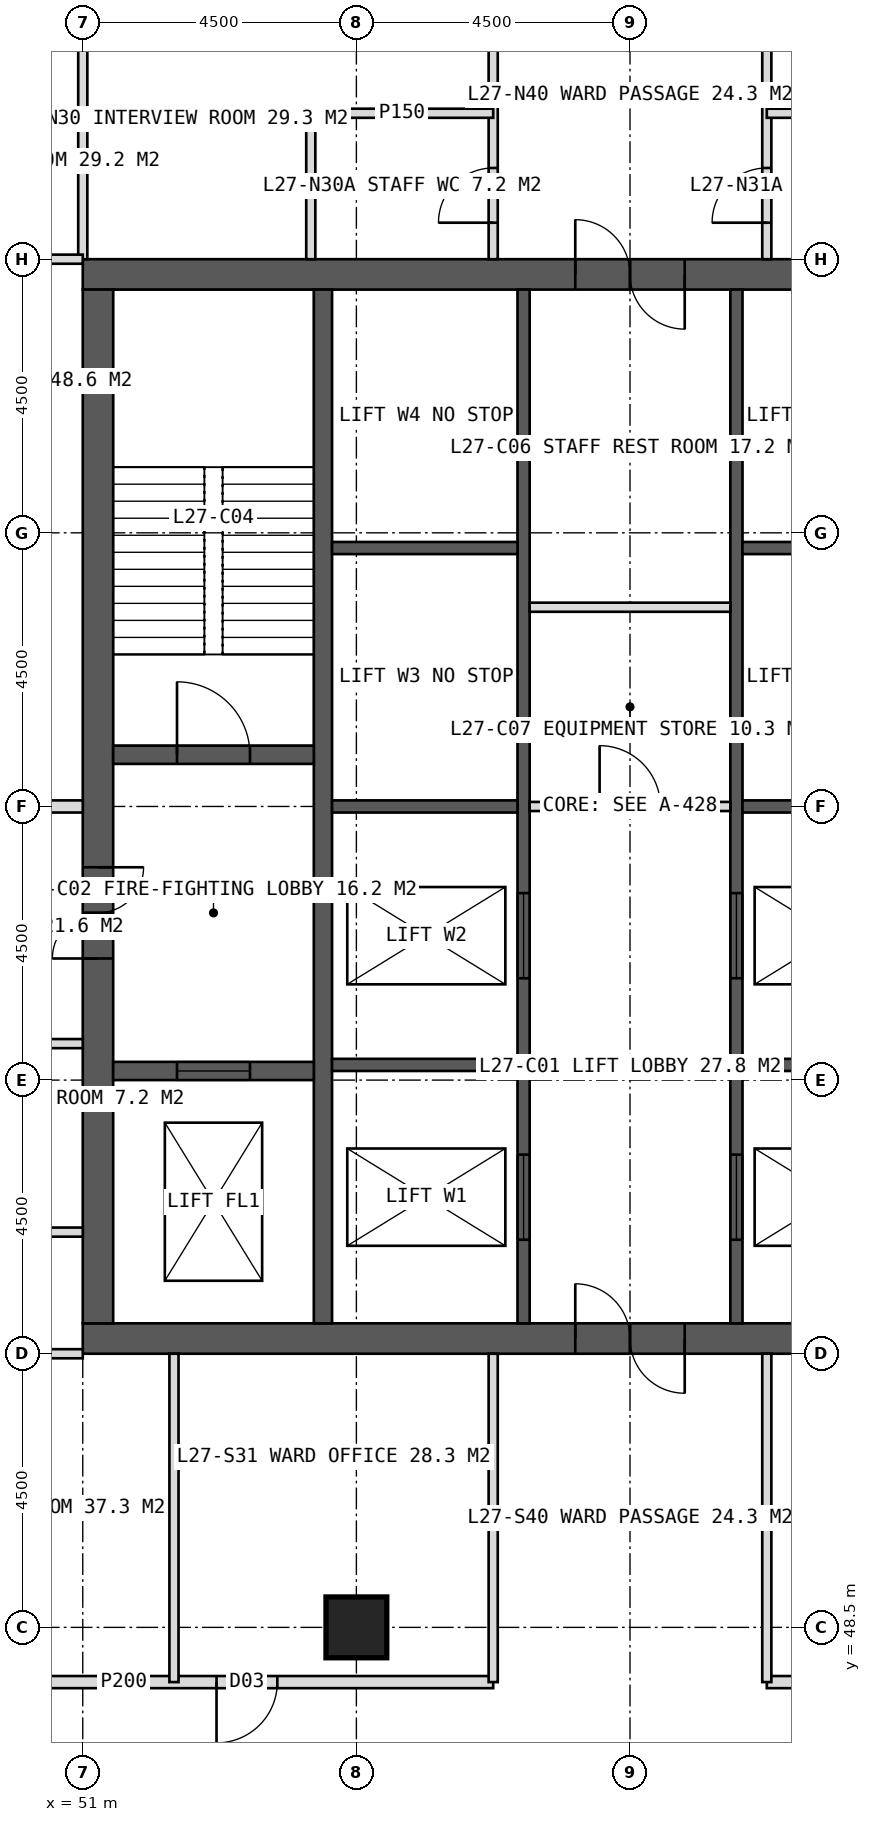
"""IFC4 building model, lengths in metres.
Left out: names, types, materials, properties, quantities, classifications, styles, units other than length and angle.
Written with IfcOpenShell. Run it as: python <this file> out.ifc"""

import sys

from ifc_helpers import new_model, si_unit, direction, frame, frame_2d, origin, origin_2d, place, context, subcontext, project, spatial, rectangle, hollow_rectangle, extrude, element, fill, save


model = new_model("IFC4")
c1 = context("Model", 3, precision=1e-05, world=origin(), true_north=direction((0.0, 1.0)))
c2 = subcontext(c1, "Body", "Model", "MODEL_VIEW")
j1 = project(units=[si_unit("LENGTHUNIT", "METRE"), si_unit("PLANEANGLEUNIT", "RADIAN")], contexts=[c1])
p1 = place(None, origin())
s1 = spatial("IfcSite", under=j1, at=p1, CompositionType="ELEMENT")
p2 = place(p1, origin())
s2 = spatial("IfcBuilding", under=s1, at=p2, CompositionType="ELEMENT")
p3 = place(p2, frame((0.0, 0.0, 116.0)))
s3 = spatial("IfcBuildingStorey", under=s2, at=p3, CompositionType="ELEMENT", Elevation=116.0)
p4 = place(p3, frame((51.0, 70.75, 0.0), z_axis=(0.0, 0.0, 1.0), x_axis=(1.0, 0.0, 0.0)))
e1 = element("IfcWall", 1, at=p4, inside=s3, PredefinedType="SHEAR", context=c2, shape_type="SweptSolid", body=[
    extrude(rectangle(XDim=18.0, YDim=0.5, at=frame_2d((9.0, 0.0))), origin(), (0.0, 0.0, 1.0), 4.0),
])
p5 = place(p4, frame((8.1, 0.0, 0.0)))
e2 = element("IfcOpeningElement", 2, at=p5, cuts=e1, PredefinedType="OPENING", context=c2, shape_type="SweptSolid", body=[
    extrude(rectangle(XDim=1.8, YDim=2.2, at=frame_2d((0.9, 1.1))), frame((0.0, 0.26, 0.0), z_axis=(0.0, -1.0, 0.0), x_axis=(1.0, 0.0, 0.0)), (0.0, 0.0, 1.0), 0.52),
])
p6 = place(p3, frame((51.0, 53.25, 0.0), z_axis=(0.0, 0.0, 1.0), x_axis=(1.0, 0.0, 0.0)))
e3 = element("IfcWall", 3, at=p6, inside=s3, PredefinedType="SHEAR", context=c2, shape_type="SweptSolid", body=[
    extrude(rectangle(XDim=18.0, YDim=0.5, at=frame_2d((9.0, 0.0))), origin(), (0.0, 0.0, 1.0), 4.0),
])
p7 = place(p6, frame((8.1, 0.0, 0.0)))
e4 = element("IfcOpeningElement", 4, at=p7, cuts=e3, PredefinedType="OPENING", context=c2, shape_type="SweptSolid", body=[
    extrude(rectangle(XDim=1.8, YDim=2.2, at=frame_2d((0.9, 1.1))), frame((0.0, 0.26, 0.0), z_axis=(0.0, -1.0, 0.0), x_axis=(1.0, 0.0, 0.0)), (0.0, 0.0, 1.0), 0.52),
])
p8 = place(p3, frame((51.25, 53.5, 0.0), z_axis=(0.0, 0.0, 1.0), x_axis=(0.0, 1.0, 0.0)))
e5 = element("IfcWall", 5, at=p8, inside=s3, PredefinedType="SHEAR", context=c2, shape_type="SweptSolid", body=[
    extrude(rectangle(XDim=17.0, YDim=0.5, at=frame_2d((8.5, 0.0))), origin(), (0.0, 0.0, 1.0), 4.0),
])
p9 = place(p8, frame((6.0, 0.0, 0.0)))
e6 = element("IfcOpeningElement", 6, at=p9, cuts=e5, PredefinedType="OPENING", context=c2, shape_type="SweptSolid", body=[
    extrude(rectangle(XDim=1.5, YDim=2.2, at=frame_2d((0.75, 1.1))), frame((0.0, 0.26, 0.0), z_axis=(0.0, -1.0, 0.0), x_axis=(1.0, 0.0, 0.0)), (0.0, 0.0, 1.0), 0.52),
])
p10 = place(p3, frame((54.95, 53.5, 0.0), z_axis=(0.0, 0.0, 1.0), x_axis=(0.0, 1.0, 0.0)))
e7 = element("IfcWall", 7, at=p10, inside=s3, PredefinedType="SHEAR", context=c2, shape_type="SweptSolid", body=[
    extrude(rectangle(XDim=17.0, YDim=0.3, at=frame_2d((8.5, 0.0))), origin(), (0.0, 0.0, 1.0), 4.0),
])
p11 = place(p3, frame((58.25, 53.5, 0.0), z_axis=(0.0, 0.0, 1.0), x_axis=(0.0, 1.0, 0.0)))
e8 = element("IfcWall", 8, at=p11, inside=s3, PredefinedType="SHEAR", context=c2, shape_type="SweptSolid", body=[
    extrude(rectangle(XDim=17.0, YDim=0.2, at=frame_2d((8.5, 0.0))), origin(), (0.0, 0.0, 1.0), 4.0),
])
p12 = place(p11, frame((1.375, 0.0, 0.0)))
e9 = element("IfcOpeningElement", 9, at=p12, cuts=e8, PredefinedType="OPENING", context=c2, shape_type="SweptSolid", body=[
    extrude(rectangle(XDim=1.4, YDim=2.2, at=frame_2d((0.7, 1.1))), frame((0.0, 0.11, 0.0), z_axis=(0.0, -1.0, 0.0), x_axis=(1.0, 0.0, 0.0)), (0.0, 0.0, 1.0), 0.22),
])
p13 = place(p11, frame((5.675, 0.0, 0.0)))
e10 = element("IfcOpeningElement", 10, at=p13, cuts=e8, PredefinedType="OPENING", context=c2, shape_type="SweptSolid", body=[
    extrude(rectangle(XDim=1.4, YDim=2.2, at=frame_2d((0.7, 1.1))), frame((0.0, 0.11, 0.0), z_axis=(0.0, -1.0, 0.0), x_axis=(1.0, 0.0, 0.0)), (0.0, 0.0, 1.0), 0.22),
])
p14 = place(p3, frame((61.75, 53.5, 0.0), z_axis=(0.0, 0.0, 1.0), x_axis=(0.0, 1.0, 0.0)))
e11 = element("IfcWall", 11, at=p14, inside=s3, PredefinedType="SHEAR", context=c2, shape_type="SweptSolid", body=[
    extrude(rectangle(XDim=17.0, YDim=0.2, at=frame_2d((8.5, 0.0))), origin(), (0.0, 0.0, 1.0), 4.0),
])
p15 = place(p14, frame((1.375, 0.0, 0.0)))
e12 = element("IfcOpeningElement", 12, at=p15, cuts=e11, PredefinedType="OPENING", context=c2, shape_type="SweptSolid", body=[
    extrude(rectangle(XDim=1.4, YDim=2.2, at=frame_2d((0.7, 1.1))), frame((0.0, 0.11, 0.0), z_axis=(0.0, -1.0, 0.0), x_axis=(1.0, 0.0, 0.0)), (0.0, 0.0, 1.0), 0.22),
])
p16 = place(p14, frame((5.675, 0.0, 0.0)))
e13 = element("IfcOpeningElement", 13, at=p16, cuts=e11, PredefinedType="OPENING", context=c2, shape_type="SweptSolid", body=[
    extrude(rectangle(XDim=1.4, YDim=2.2, at=frame_2d((0.7, 1.1))), frame((0.0, 0.11, 0.0), z_axis=(0.0, -1.0, 0.0), x_axis=(1.0, 0.0, 0.0)), (0.0, 0.0, 1.0), 0.22),
])
for number, where, z_axis, x_axis in (
    (14, (55.1, 57.75, 0.0), (0.0, 0.0, 1.0), (1.0, 0.0, 0.0)),
    (15, (61.85, 57.75, 0.0), (0.0, 0.0, 1.0), (1.0, 0.0, 0.0)),
    (16, (55.1, 62.0, 0.0), (0.0, 0.0, 1.0), (1.0, 0.0, 0.0)),
    (17, (61.85, 62.0, 0.0), (0.0, 0.0, 1.0), (1.0, 0.0, 0.0)),
    (18, (55.1, 66.25, 0.0), (0.0, 0.0, 1.0), (1.0, 0.0, 0.0)),
    (19, (61.85, 66.25, 0.0), (0.0, 0.0, 1.0), (1.0, 0.0, 0.0)),
):
    element("IfcWall", number, at=place(p3, frame(where, z_axis=z_axis, x_axis=x_axis)), inside=s3, PredefinedType="SHEAR", context=c2, shape_type="SweptSolid", body=[
        extrude(rectangle(XDim=3.05, YDim=0.2, at=frame_2d((1.525, 0.0))), origin(), (0.0, 0.0, 1.0), 4.0),
    ])
p17 = place(p3, frame((51.5, 62.85, 0.0), z_axis=(0.0, 0.0, 1.0), x_axis=(1.0, 0.0, 0.0)))
e20 = element("IfcWall", 20, at=p17, inside=s3, PredefinedType="SHEAR", context=c2, shape_type="SweptSolid", body=[
    extrude(rectangle(XDim=3.3, YDim=0.3, at=frame_2d((1.65, 0.0))), origin(), (0.0, 0.0, 1.0), 4.0),
])
p18 = place(p17, frame((1.05, 0.0, 0.0)))
e21 = element("IfcOpeningElement", 21, at=p18, cuts=e20, PredefinedType="OPENING", context=c2, shape_type="SweptSolid", body=[
    extrude(rectangle(XDim=1.2, YDim=2.1, at=frame_2d((0.6, 1.05))), frame((0.0, 0.16, 0.0), z_axis=(0.0, -1.0, 0.0), x_axis=(1.0, 0.0, 0.0)), (0.0, 0.0, 1.0), 0.32),
])
p19 = place(p3, frame((51.5, 57.65, 0.0), z_axis=(0.0, 0.0, 1.0), x_axis=(1.0, 0.0, 0.0)))
e22 = element("IfcWall", 22, at=p19, inside=s3, PredefinedType="SHEAR", context=c2, shape_type="SweptSolid", body=[
    extrude(rectangle(XDim=3.3, YDim=0.3, at=frame_2d((1.65, 0.0))), origin(), (0.0, 0.0, 1.0), 4.0),
])
p20 = place(p19, frame((1.05, 0.0, 0.0)))
e23 = element("IfcOpeningElement", 23, at=p20, cuts=e22, PredefinedType="OPENING", context=c2, shape_type="SweptSolid", body=[
    extrude(rectangle(XDim=1.2, YDim=2.2, at=frame_2d((0.6, 1.1))), frame((0.0, 0.16, 0.0), z_axis=(0.0, -1.0, 0.0), x_axis=(1.0, 0.0, 0.0)), (0.0, 0.0, 1.0), 0.32),
])
p21 = place(p3, frame((55.5, 48.5, 0.0), z_axis=(0.0, 0.0, 1.0), x_axis=(1.0, 0.0, 0.0)))
e24 = element("IfcColumn", 24, at=p21, inside=s3, PredefinedType="COLUMN", context=c2, shape_type="SweptSolid", body=[
    extrude(hollow_rectangle(XDim=1.0, YDim=1.0, WallThickness=0.1, at=origin_2d()), origin(), (0.0, 0.0, 1.0), 4.0),
])
p22 = place(p3, frame((51.0, 71.0, 0.0), z_axis=(0.0, 0.0, 1.0), x_axis=(0.0, 1.0, 0.0)))
e25 = element("IfcWall", 25, at=p22, inside=s3, PredefinedType="PARTITIONING", context=c2, shape_type="SweptSolid", body=[
    extrude(rectangle(XDim=5.4, YDim=0.15, at=frame_2d((2.7, 0.0))), origin(), (0.0, 0.0, 1.0), 3.75),
])
p23 = place(p3, frame((57.75, 71.0, 0.0), z_axis=(0.0, 0.0, 1.0), x_axis=(0.0, 1.0, 0.0)))
e26 = element("IfcWall", 26, at=p23, inside=s3, PredefinedType="PARTITIONING", context=c2, shape_type="SweptSolid", body=[
    extrude(rectangle(XDim=5.4, YDim=0.15, at=frame_2d((2.7, 0.0))), origin(), (0.0, 0.0, 1.0), 3.75),
])
p24 = place(p23, frame((0.6, 0.0, 0.0)))
e27 = element("IfcOpeningElement", 27, at=p24, cuts=e26, PredefinedType="OPENING", context=c2, shape_type="SweptSolid", body=[
    extrude(rectangle(XDim=0.9, YDim=2.1, at=frame_2d((0.45, 1.05))), frame((0.0, 0.085, 0.0), z_axis=(0.0, -1.0, 0.0), x_axis=(1.0, 0.0, 0.0)), (0.0, 0.0, 1.0), 0.17),
])
p25 = place(p3, frame((62.25, 71.0, 0.0), z_axis=(0.0, 0.0, 1.0), x_axis=(0.0, 1.0, 0.0)))
e28 = element("IfcWall", 28, at=p25, inside=s3, PredefinedType="PARTITIONING", context=c2, shape_type="SweptSolid", body=[
    extrude(rectangle(XDim=5.4, YDim=0.15, at=frame_2d((2.7, 0.0))), origin(), (0.0, 0.0, 1.0), 3.75),
])
p26 = place(p25, frame((0.6, 0.0, 0.0)))
e29 = element("IfcOpeningElement", 29, at=p26, cuts=e28, PredefinedType="OPENING", context=c2, shape_type="SweptSolid", body=[
    extrude(rectangle(XDim=0.9, YDim=2.1, at=frame_2d((0.45, 1.05))), frame((0.0, 0.085, 0.0), z_axis=(0.0, -1.0, 0.0), x_axis=(1.0, 0.0, 0.0)), (0.0, 0.0, 1.0), 0.17),
])
p27 = place(p3, frame((54.75, 73.4, 0.0), z_axis=(0.0, 0.0, 1.0), x_axis=(1.0, 0.0, 0.0)))
e30 = element("IfcWall", 30, at=p27, inside=s3, PredefinedType="PARTITIONING", context=c2, shape_type="SweptSolid", body=[
    extrude(rectangle(XDim=3.0, YDim=0.15, at=frame_2d((1.5, 0.0))), origin(), (0.0, 0.0, 1.0), 3.75),
])
p28 = place(p3, frame((54.75, 71.0, 0.0), z_axis=(0.0, 0.0, 1.0), x_axis=(0.0, 1.0, 0.0)))
e31 = element("IfcWall", 31, at=p28, inside=s3, PredefinedType="PARTITIONING", context=c2, shape_type="SweptSolid", body=[
    extrude(rectangle(XDim=2.4, YDim=0.15, at=frame_2d((1.2, 0.0))), origin(), (0.0, 0.0, 1.0), 3.75),
])
p29 = place(p3, frame((62.25, 73.4, 0.0), z_axis=(0.0, 0.0, 1.0), x_axis=(1.0, 0.0, 0.0)))
e32 = element("IfcWall", 32, at=p29, inside=s3, PredefinedType="PARTITIONING", context=c2, shape_type="SweptSolid", body=[
    extrude(rectangle(XDim=3.0, YDim=0.15, at=frame_2d((1.5, 0.0))), origin(), (0.0, 0.0, 1.0), 3.75),
])
p30 = place(p3, frame((51.0, 53.0, 0.0), z_axis=(0.0, 0.0, 1.0), x_axis=(-1.0, 0.0, 0.0)))
e33 = element("IfcWall", 33, at=p30, inside=s3, PredefinedType="PARTITIONING", context=c2, shape_type="SweptSolid", body=[
    extrude(rectangle(XDim=5.4, YDim=0.15, at=frame_2d((2.7, 0.0))), origin(), (0.0, 0.0, 1.0), 3.75),
])
p31 = place(p3, frame((51.0, 58.1, 0.0), z_axis=(0.0, 0.0, 1.0), x_axis=(-1.0, 0.0, 0.0)))
e34 = element("IfcWall", 34, at=p31, inside=s3, PredefinedType="PARTITIONING", context=c2, shape_type="SweptSolid", body=[
    extrude(rectangle(XDim=5.4, YDim=0.15, at=frame_2d((2.7, 0.0))), origin(), (0.0, 0.0, 1.0), 3.75),
])
p32 = place(p31, frame((0.6, 0.0, 0.0)))
e35 = element("IfcOpeningElement", 35, at=p32, cuts=e34, PredefinedType="OPENING", context=c2, shape_type="SweptSolid", body=[
    extrude(rectangle(XDim=0.9, YDim=2.1, at=frame_2d((0.45, 1.05))), frame((0.0, 0.085, 0.0), z_axis=(0.0, -1.0, 0.0), x_axis=(1.0, 0.0, 0.0)), (0.0, 0.0, 1.0), 0.17),
])
p33 = place(p3, frame((51.0, 62.0, 0.0), z_axis=(0.0, 0.0, 1.0), x_axis=(-1.0, 0.0, 0.0)))
e36 = element("IfcWall", 36, at=p33, inside=s3, PredefinedType="SOLIDWALL", context=c2, shape_type="SweptSolid", body=[
    extrude(rectangle(XDim=5.4, YDim=0.2, at=frame_2d((2.7, 0.0))), origin(), (0.0, 0.0, 1.0), 2.95),
])
p34 = place(p3, frame((51.0, 71.0, 0.0), z_axis=(0.0, 0.0, 1.0), x_axis=(-1.0, 0.0, 0.0)))
e37 = element("IfcWall", 37, at=p34, inside=s3, PredefinedType="PARTITIONING", context=c2, shape_type="SweptSolid", body=[
    extrude(rectangle(XDim=5.4, YDim=0.15, at=frame_2d((2.7, 0.0))), origin(), (0.0, 0.0, 1.0), 3.75),
])
p35 = place(p3, frame((51.0, 55.0, 0.0), z_axis=(0.0, 0.0, 1.0), x_axis=(-1.0, 0.0, 0.0)))
e38 = element("IfcWall", 38, at=p35, inside=s3, PredefinedType="PARTITIONING", context=c2, shape_type="SweptSolid", body=[
    extrude(rectangle(XDim=2.4, YDim=0.15, at=frame_2d((1.2, 0.0))), origin(), (0.0, 0.0, 1.0), 3.75),
])
p36 = place(p3, frame((74.4, 47.6, 0.0), z_axis=(0.0, 0.0, 1.0), x_axis=(-1.0, 0.0, 0.0)))
e39 = element("IfcWall", 39, at=p36, inside=s3, PredefinedType="PARTITIONING", context=c2, shape_type="SweptSolid", body=[
    extrude(rectangle(XDim=12.15, YDim=0.2, at=frame_2d((6.075, 0.0))), origin(), (0.0, 0.0, 1.0), 3.75),
])
p37 = place(p36, frame((6.85, 0.0, 0.0)))
e40 = element("IfcOpeningElement", 40, at=p37, cuts=e39, PredefinedType="OPENING", context=c2, shape_type="SweptSolid", body=[
    extrude(rectangle(XDim=1.0, YDim=2.1, at=frame_2d((0.5, 1.05))), frame((0.0, 0.11, 0.0), z_axis=(0.0, -1.0, 0.0), x_axis=(1.0, 0.0, 0.0)), (0.0, 0.0, 1.0), 0.22),
])
p38 = place(p3, frame((57.75, 47.6, 0.0), z_axis=(0.0, 0.0, 1.0), x_axis=(-1.0, 0.0, 0.0)))
e41 = element("IfcWall", 41, at=p38, inside=s3, PredefinedType="PARTITIONING", context=c2, shape_type="SweptSolid", body=[
    extrude(rectangle(XDim=12.15, YDim=0.2, at=frame_2d((6.075, 0.0))), origin(), (0.0, 0.0, 1.0), 3.75),
])
p39 = place(p38, frame((3.55, 0.0, 0.0)))
e42 = element("IfcOpeningElement", 42, at=p39, cuts=e41, PredefinedType="OPENING", context=c2, shape_type="SweptSolid", body=[
    extrude(rectangle(XDim=1.0, YDim=2.1, at=frame_2d((0.5, 1.05))), frame((0.0, 0.11, 0.0), z_axis=(0.0, -1.0, 0.0), x_axis=(1.0, 0.0, 0.0)), (0.0, 0.0, 1.0), 0.22),
])
p40 = place(p38, frame((8.2, 0.0, 0.0)))
e43 = element("IfcOpeningElement", 43, at=p40, cuts=e41, PredefinedType="OPENING", context=c2, shape_type="SweptSolid", body=[
    extrude(rectangle(XDim=1.0, YDim=2.1, at=frame_2d((0.5, 1.05))), frame((0.0, 0.11, 0.0), z_axis=(0.0, -1.0, 0.0), x_axis=(1.0, 0.0, 0.0)), (0.0, 0.0, 1.0), 0.22),
])
for number, where, z_axis, x_axis in (
    (44, (62.25, 53.0, 0.0), (0.0, 0.0, 1.0), (0.0, -1.0, 0.0)),
    (45, (57.75, 53.0, 0.0), (0.0, 0.0, 1.0), (0.0, -1.0, 0.0)),
    (46, (52.5, 53.0, 0.0), (0.0, 0.0, 1.0), (0.0, -1.0, 0.0)),
):
    element("IfcWall", number, at=place(p3, frame(where, z_axis=z_axis, x_axis=x_axis)), inside=s3, PredefinedType="PARTITIONING", context=c2, shape_type="SweptSolid", body=[
        extrude(rectangle(XDim=5.4, YDim=0.15, at=frame_2d((2.7, 0.0))), origin(), (0.0, 0.0, 1.0), 3.75),
    ])
p41 = place(p3, frame((58.35, 62.0, 0.0), z_axis=(0.0, 0.0, 1.0), x_axis=(1.0, 0.0, 0.0)))
e47 = element("IfcWall", 47, at=p41, inside=s3, PredefinedType="PARTITIONING", context=c2, shape_type="SweptSolid", body=[
    extrude(rectangle(XDim=3.3, YDim=0.15, at=frame_2d((1.65, 0.0))), origin(), (0.0, 0.0, 1.0), 3.75),
])
p42 = place(p41, frame((1.15, 0.0, 0.0)))
e48 = element("IfcOpeningElement", 48, at=p42, cuts=e47, PredefinedType="OPENING", context=c2, shape_type="SweptSolid", body=[
    extrude(rectangle(XDim=1.0, YDim=2.1, at=frame_2d((0.5, 1.05))), frame((0.0, 0.085, 0.0), z_axis=(0.0, -1.0, 0.0), x_axis=(1.0, 0.0, 0.0)), (0.0, 0.0, 1.0), 0.17),
])
p43 = place(p3, frame((58.35, 65.277, 0.0), z_axis=(0.0, 0.0, 1.0), x_axis=(1.0, 0.0, 0.0)))
e49 = element("IfcWall", 49, at=p43, inside=s3, PredefinedType="PARTITIONING", context=c2, shape_type="SweptSolid", body=[
    extrude(rectangle(XDim=3.3, YDim=0.15, at=frame_2d((1.65, 0.0))), origin(), (0.0, 0.0, 1.0), 3.75),
])
p44 = place(p24, origin())
e50 = element("IfcDoor", 50, at=p44, inside=s3, OperationType="SINGLE_SWING_LEFT", PredefinedType="DOOR", context=c2, shape_type="SweptSolid", body=[
    extrude(rectangle(XDim=0.9, YDim=2.1, at=frame_2d((0.45, 1.05))), frame((0.0, 0.025, 0.0), z_axis=(0.0, -1.0, 0.0), x_axis=(1.0, 0.0, 0.0)), (0.0, 0.0, 1.0), 0.05),
])
fill(e27, e50)
p45 = place(p26, origin())
e51 = element("IfcDoor", 51, at=p45, inside=s3, OperationType="SINGLE_SWING_LEFT", PredefinedType="DOOR", context=c2, shape_type="SweptSolid", body=[
    extrude(rectangle(XDim=0.9, YDim=2.1, at=frame_2d((0.45, 1.05))), frame((0.0, 0.025, 0.0), z_axis=(0.0, -1.0, 0.0), x_axis=(1.0, 0.0, 0.0)), (0.0, 0.0, 1.0), 0.05),
])
fill(e29, e51)
p46 = place(p39, origin())
e52 = element("IfcDoor", 52, at=p46, inside=s3, OperationType="SINGLE_SWING_RIGHT", PredefinedType="DOOR", context=c2, shape_type="SweptSolid", body=[
    extrude(rectangle(XDim=1.0, YDim=2.1, at=frame_2d((0.5, 1.05))), frame((0.0, 0.025, 0.0), z_axis=(0.0, -1.0, 0.0), x_axis=(1.0, 0.0, 0.0)), (0.0, 0.0, 1.0), 0.05),
])
fill(e42, e52)
p47 = place(p7, origin())
e53 = element("IfcDoor", 53, at=p47, inside=s3, OperationType="DOUBLE_DOOR_SINGLE_SWING", PredefinedType="DOOR", context=c2, shape_type="SweptSolid", body=[
    extrude(rectangle(XDim=1.8, YDim=2.2, at=frame_2d((0.9, 1.1))), frame((0.0, 0.025, 0.0), z_axis=(0.0, -1.0, 0.0), x_axis=(1.0, 0.0, 0.0)), (0.0, 0.0, 1.0), 0.05),
])
fill(e4, e53)
p48 = place(p9, origin())
e54 = element("IfcDoor", 54, at=p48, inside=s3, OperationType="DOUBLE_DOOR_SINGLE_SWING", PredefinedType="DOOR", context=c2, shape_type="SweptSolid", body=[
    extrude(rectangle(XDim=1.5, YDim=2.2, at=frame_2d((0.75, 1.1))), frame((0.0, 0.025, 0.0), z_axis=(0.0, -1.0, 0.0), x_axis=(1.0, 0.0, 0.0)), (0.0, 0.0, 1.0), 0.05),
])
fill(e6, e54)
p49 = place(p18, origin())
e55 = element("IfcDoor", 55, at=p49, inside=s3, OperationType="SINGLE_SWING_LEFT", PredefinedType="DOOR", context=c2, shape_type="SweptSolid", body=[
    extrude(rectangle(XDim=1.2, YDim=2.1, at=frame_2d((0.6, 1.05))), frame((0.0, 0.025, 0.0), z_axis=(0.0, -1.0, 0.0), x_axis=(1.0, 0.0, 0.0)), (0.0, 0.0, 1.0), 0.05),
])
fill(e21, e55)
p50 = place(p20, origin())
e56 = element("IfcDoor", 56, at=p50, inside=s3, OperationType="SLIDING_TO_LEFT", PredefinedType="DOOR", context=c2, shape_type="SweptSolid", body=[
    extrude(rectangle(XDim=1.2, YDim=2.2, at=frame_2d((0.6, 1.1))), frame((0.0, 0.025, 0.0), z_axis=(0.0, -1.0, 0.0), x_axis=(1.0, 0.0, 0.0)), (0.0, 0.0, 1.0), 0.05),
])
fill(e23, e56)
p51 = place(p12, origin())
e57 = element("IfcDoor", 57, at=p51, inside=s3, OperationType="SLIDING_TO_LEFT", PredefinedType="DOOR", context=c2, shape_type="SweptSolid", body=[
    extrude(rectangle(XDim=1.4, YDim=2.2, at=frame_2d((0.7, 1.1))), frame((0.0, 0.025, 0.0), z_axis=(0.0, -1.0, 0.0), x_axis=(1.0, 0.0, 0.0)), (0.0, 0.0, 1.0), 0.05),
])
fill(e9, e57)
p52 = place(p15, origin())
e58 = element("IfcDoor", 58, at=p52, inside=s3, OperationType="SLIDING_TO_LEFT", PredefinedType="DOOR", context=c2, shape_type="SweptSolid", body=[
    extrude(rectangle(XDim=1.4, YDim=2.2, at=frame_2d((0.7, 1.1))), frame((0.0, 0.025, 0.0), z_axis=(0.0, -1.0, 0.0), x_axis=(1.0, 0.0, 0.0)), (0.0, 0.0, 1.0), 0.05),
])
fill(e12, e58)
p53 = place(p13, origin())
e59 = element("IfcDoor", 59, at=p53, inside=s3, OperationType="SLIDING_TO_LEFT", PredefinedType="DOOR", context=c2, shape_type="SweptSolid", body=[
    extrude(rectangle(XDim=1.4, YDim=2.2, at=frame_2d((0.7, 1.1))), frame((0.0, 0.025, 0.0), z_axis=(0.0, -1.0, 0.0), x_axis=(1.0, 0.0, 0.0)), (0.0, 0.0, 1.0), 0.05),
])
fill(e10, e59)
p54 = place(p16, origin())
e60 = element("IfcDoor", 60, at=p54, inside=s3, OperationType="SLIDING_TO_LEFT", PredefinedType="DOOR", context=c2, shape_type="SweptSolid", body=[
    extrude(rectangle(XDim=1.4, YDim=2.2, at=frame_2d((0.7, 1.1))), frame((0.0, 0.025, 0.0), z_axis=(0.0, -1.0, 0.0), x_axis=(1.0, 0.0, 0.0)), (0.0, 0.0, 1.0), 0.05),
])
fill(e13, e60)
p55 = place(p42, origin())
e61 = element("IfcDoor", 61, at=p55, inside=s3, OperationType="SINGLE_SWING_LEFT", PredefinedType="DOOR", context=c2, shape_type="SweptSolid", body=[
    extrude(rectangle(XDim=1.0, YDim=2.1, at=frame_2d((0.5, 1.05))), frame((0.0, 0.025, 0.0), z_axis=(0.0, -1.0, 0.0), x_axis=(1.0, 0.0, 0.0)), (0.0, 0.0, 1.0), 0.05),
])
fill(e48, e61)
p56 = place(p5, origin())
e62 = element("IfcDoor", 62, at=p56, inside=s3, OperationType="DOUBLE_DOOR_SINGLE_SWING", PredefinedType="DOOR", context=c2, shape_type="SweptSolid", body=[
    extrude(rectangle(XDim=1.8, YDim=2.2, at=frame_2d((0.9, 1.1))), frame((0.0, 0.025, 0.0), z_axis=(0.0, -1.0, 0.0), x_axis=(1.0, 0.0, 0.0)), (0.0, 0.0, 1.0), 0.05),
])
fill(e2, e62)
save(model, sys.argv[1])
